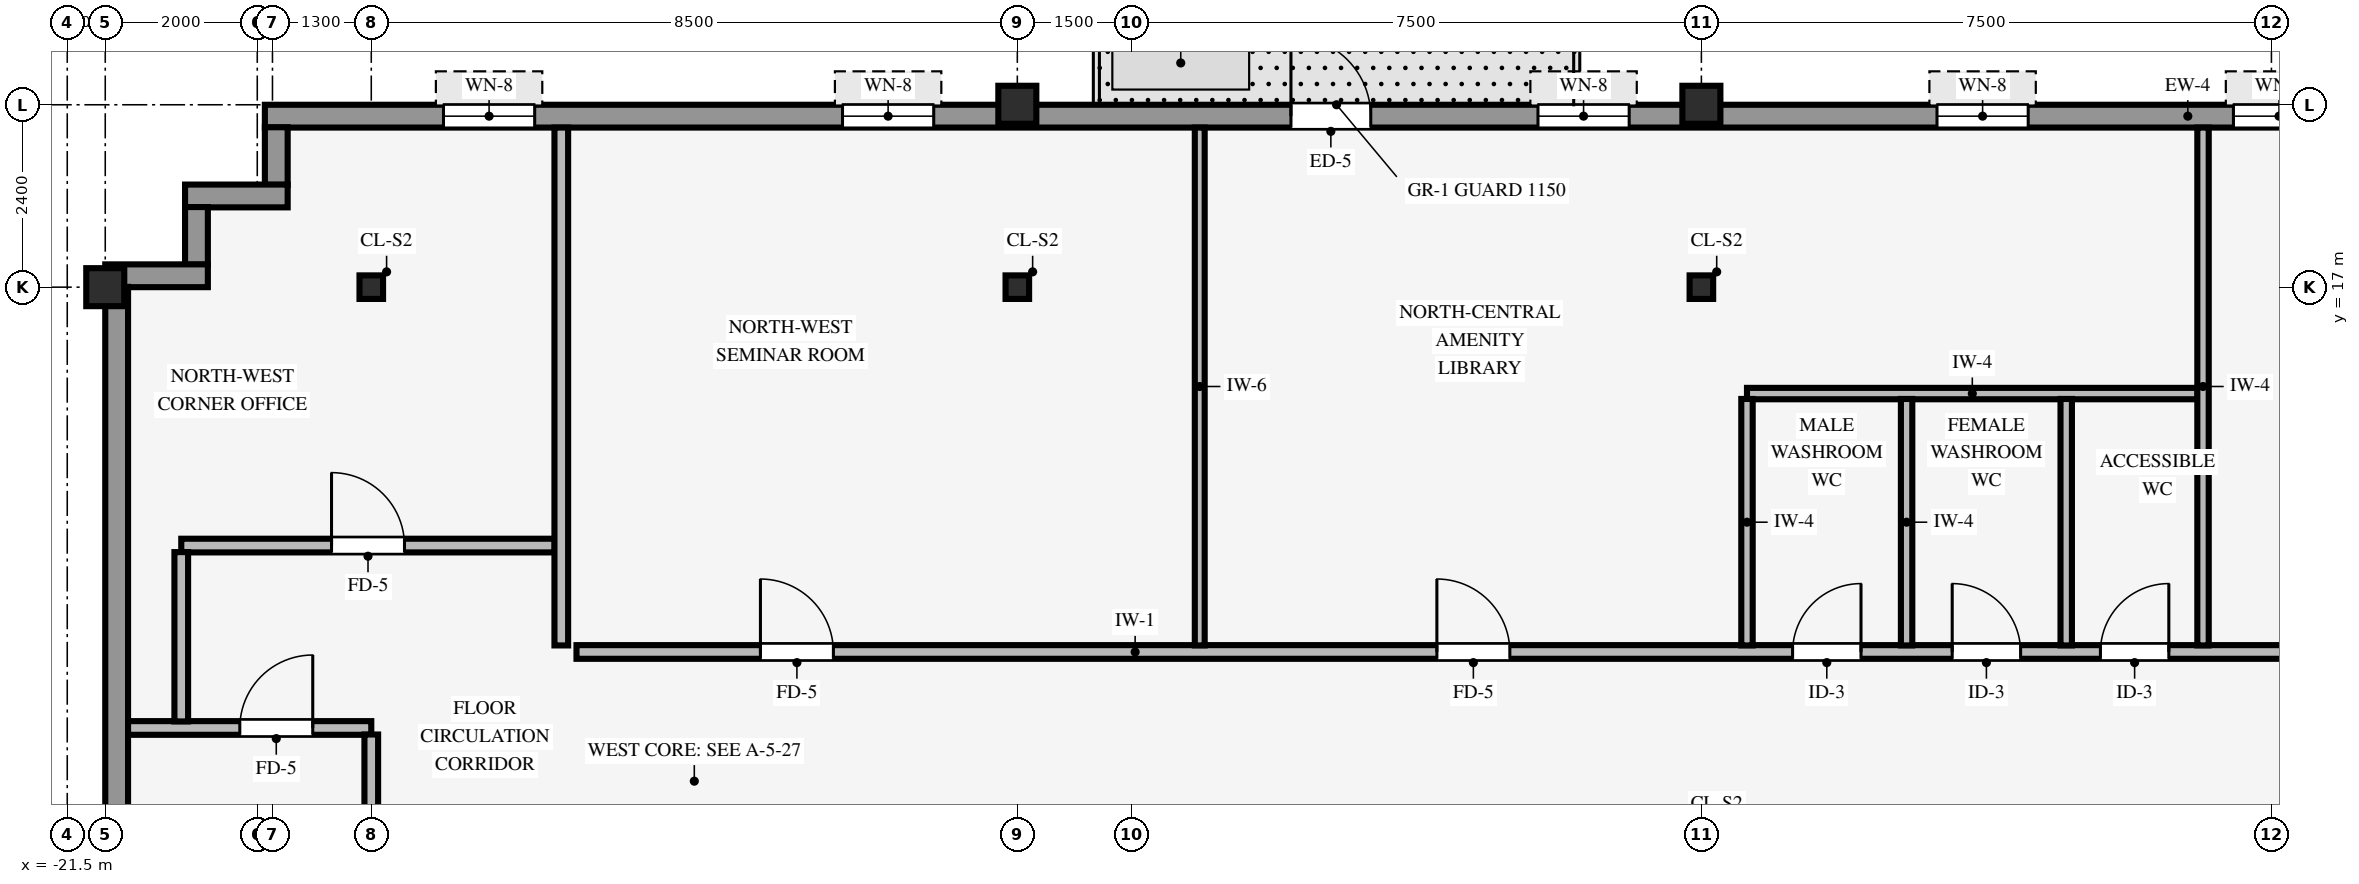
"""IFC4 building model, lengths in metres.
Left out: names, types, materials, properties, quantities, classifications, styles, units other than length and angle.
Written with IfcOpenShell. Run it as: python <this file> out.ifc"""

import sys

from ifc_helpers import new_model, si_unit, direction, frame, frame_2d, origin, origin_2d, place, context, subcontext, project, spatial, rectangle, hollow_rectangle, i_section, extrude, source, transform, mapped, element, fill, save


model = new_model("IFC4")
c1 = context("Model", 3, precision=1e-05, world=origin(), true_north=direction((0.0, 1.0)))
c2 = subcontext(c1, "Body", "Model", "MODEL_VIEW")
j1 = project(units=[si_unit("LENGTHUNIT", "METRE"), si_unit("PLANEANGLEUNIT", "RADIAN")], contexts=[c1])
p1 = place(None, origin())
s1 = spatial("IfcSite", under=j1, at=p1, CompositionType="ELEMENT")
p2 = place(p1, origin())
s2 = spatial("IfcBuilding", under=s1, at=p2, CompositionType="ELEMENT")
p3 = place(p2, frame((0.0, 0.0, 249.3)))
s3 = spatial("IfcBuildingStorey", under=s2, at=p3, CompositionType="ELEMENT", Elevation=249.3)
for number, where, z_axis, x_axis in (
    (1, (-21.0, 17.0, 0.0), (0.0, 0.0, 1.0), (1.0, 0.0, 0.0)),
    (2, (-9.0, 19.4, 0.0), (0.0, 0.0, 1.0), (1.0, 0.0, 0.0)),
    (3, (0.0, 19.4, 0.0), (0.0, 0.0, 1.0), (1.0, 0.0, 0.0)),
):
    element("IfcColumn", number, at=place(p3, frame(where, z_axis=z_axis, x_axis=x_axis)), inside=s3, PredefinedType="COLUMN", context=c2, shape_type="SweptSolid", body=[
        extrude(hollow_rectangle(XDim=0.5, YDim=0.5, WallThickness=0.032, InnerFilletRadius=0.032, OuterFilletRadius=0.064, at=origin_2d()), origin(), (0.0, 0.0, 1.0), 3.25),
    ])
for number, where, z_axis, x_axis in (
    (4, (0.0, 17.0, 0.0), (0.0, 0.0, 1.0), (1.0, 0.0, 0.0)),
    (5, (-17.5, 17.0, 0.0), (0.0, 0.0, 1.0), (1.0, 0.0, 0.0)),
    (6, (-9.0, 17.0, 0.0), (0.0, 0.0, 1.0), (1.0, 0.0, 0.0)),
):
    element("IfcColumn", number, at=place(p3, frame(where, z_axis=z_axis, x_axis=x_axis)), inside=s3, PredefinedType="COLUMN", context=c2, shape_type="SweptSolid", body=[
        extrude(i_section(OverallWidth=0.31, OverallDepth=0.31, WebThickness=0.015, FlangeThickness=0.015, FilletRadius=0.015, at=origin_2d()), origin(), (0.0, 0.0, 1.0), 3.25),
    ])
p4 = place(p3, frame((-18.9, 19.25, 0.0), z_axis=(0.0, 0.0, 1.0), x_axis=(1.0, 0.0, 0.0)))
e7 = element("IfcWall", 7, at=p4, inside=s3, PredefinedType="STANDARD", context=c2, shape_type="SweptSolid", body=[
    extrude(rectangle(XDim=35.6, YDim=0.3, at=frame_2d((17.8, 0.0))), origin(), (0.0, 0.0, 1.0), 2.585),
])
p5 = place(p4, frame((13.5, 0.0, 0.0)))
e8 = element("IfcOpeningElement", 8, at=p5, cuts=e7, PredefinedType="OPENING", context=c2, shape_type="SweptSolid", body=[
    extrude(rectangle(XDim=1.05, YDim=2.1, at=frame_2d((0.525, 1.05))), frame((0.0, 0.16, 0.0), z_axis=(0.0, -1.0, 0.0), x_axis=(1.0, 0.0, 0.0)), (0.0, 0.0, 1.0), 0.32),
])
p6 = place(p4, frame((2.35, 0.0, 0.8)))
e9 = element("IfcOpeningElement", 9, at=p6, cuts=e7, PredefinedType="OPENING", context=c2, shape_type="SweptSolid", body=[
    extrude(rectangle(XDim=1.2, YDim=1.48, at=frame_2d((0.6, 0.74))), frame((0.0, 0.16, 0.0), z_axis=(0.0, -1.0, 0.0), x_axis=(1.0, 0.0, 0.0)), (0.0, 0.0, 1.0), 0.32),
])
p7 = place(p4, frame((7.6, 0.0, 0.8)))
e10 = element("IfcOpeningElement", 10, at=p7, cuts=e7, PredefinedType="OPENING", context=c2, shape_type="SweptSolid", body=[
    extrude(rectangle(XDim=1.2, YDim=1.48, at=frame_2d((0.6, 0.74))), frame((0.0, 0.16, 0.0), z_axis=(0.0, -1.0, 0.0), x_axis=(1.0, 0.0, 0.0)), (0.0, 0.0, 1.0), 0.32),
])
p8 = place(p4, frame((16.75, 0.0, 0.8)))
e11 = element("IfcOpeningElement", 11, at=p8, cuts=e7, PredefinedType="OPENING", context=c2, shape_type="SweptSolid", body=[
    extrude(rectangle(XDim=1.2, YDim=1.48, at=frame_2d((0.6, 0.74))), frame((0.0, 0.16, 0.0), z_axis=(0.0, -1.0, 0.0), x_axis=(1.0, 0.0, 0.0)), (0.0, 0.0, 1.0), 0.32),
])
p9 = place(p4, frame((22.0, 0.0, 0.8)))
e12 = element("IfcOpeningElement", 12, at=p9, cuts=e7, PredefinedType="OPENING", context=c2, shape_type="SweptSolid", body=[
    extrude(rectangle(XDim=1.2, YDim=1.48, at=frame_2d((0.6, 0.74))), frame((0.0, 0.16, 0.0), z_axis=(0.0, -1.0, 0.0), x_axis=(1.0, 0.0, 0.0)), (0.0, 0.0, 1.0), 0.32),
])
p10 = place(p4, frame((25.9, 0.0, 0.8)))
e13 = element("IfcOpeningElement", 13, at=p10, cuts=e7, PredefinedType="OPENING", context=c2, shape_type="SweptSolid", body=[
    extrude(rectangle(XDim=1.2, YDim=1.48, at=frame_2d((0.6, 0.74))), frame((0.0, 0.16, 0.0), z_axis=(0.0, -1.0, 0.0), x_axis=(1.0, 0.0, 0.0)), (0.0, 0.0, 1.0), 0.32),
])
p11 = place(p4, frame((31.6, 0.0, 0.8)))
e14 = element("IfcOpeningElement", 14, at=p11, cuts=e7, PredefinedType="OPENING", context=c2, shape_type="SweptSolid", body=[
    extrude(rectangle(XDim=1.2, YDim=1.48, at=frame_2d((0.6, 0.74))), frame((0.0, 0.16, 0.0), z_axis=(0.0, -1.0, 0.0), x_axis=(1.0, 0.0, 0.0)), (0.0, 0.0, 1.0), 0.32),
])
p12 = place(p3, frame((-18.75, 18.346, 0.0), z_axis=(0.0, 0.0, 1.0), x_axis=(0.0, 1.0, 0.0)))
e15 = element("IfcWall", 15, at=p12, inside=s3, PredefinedType="STANDARD", context=c2, shape_type="SweptSolid", body=[
    extrude(rectangle(XDim=0.758, YDim=0.3, at=frame_2d((0.379, 0.0))), origin(), (0.0, 0.0, 1.0), 2.335),
])
p13 = place(p3, frame((-19.95, 18.2, 0.0), z_axis=(0.0, 0.0, 1.0), x_axis=(1.0, 0.0, 0.0)))
e16 = element("IfcWall", 16, at=p13, inside=s3, PredefinedType="STANDARD", context=c2, shape_type="SweptSolid", body=[
    extrude(rectangle(XDim=1.35, YDim=0.3, at=frame_2d((0.675, 0.0))), origin(), (0.0, 0.0, 1.0), 2.335),
])
p14 = place(p3, frame((-19.8, 17.296, 0.0), z_axis=(0.0, 0.0, 1.0), x_axis=(0.0, 1.0, 0.0)))
e17 = element("IfcWall", 17, at=p14, inside=s3, PredefinedType="STANDARD", context=c2, shape_type="SweptSolid", body=[
    extrude(rectangle(XDim=0.758, YDim=0.3, at=frame_2d((0.379, 0.0))), origin(), (0.0, 0.0, 1.0), 2.335),
])
p15 = place(p3, frame((-21.0, 17.15, 0.0), z_axis=(0.0, 0.0, 1.0), x_axis=(1.0, 0.0, 0.0)))
e18 = element("IfcWall", 18, at=p15, inside=s3, PredefinedType="STANDARD", context=c2, shape_type="SweptSolid", body=[
    extrude(rectangle(XDim=1.35, YDim=0.3, at=frame_2d((0.675, 0.0))), origin(), (0.0, 0.0, 1.0), 2.335),
])
p16 = place(p3, frame((-20.85, 3.6, 0.0), z_axis=(0.0, 0.0, 1.0), x_axis=(0.0, 1.0, 0.0)))
e19 = element("IfcWall", 19, at=p16, inside=s3, PredefinedType="STANDARD", context=c2, shape_type="SweptSolid", body=[
    extrude(rectangle(XDim=13.404, YDim=0.3, at=frame_2d((6.702, 0.0))), origin(), (0.0, 0.0, 1.0), 2.585),
])
p17 = place(p16, frame((2.876, 0.0, 0.8)))
e20 = element("IfcOpeningElement", 20, at=p17, cuts=e19, PredefinedType="OPENING", context=c2, shape_type="SweptSolid", body=[
    extrude(rectangle(XDim=1.95, YDim=1.48, at=frame_2d((0.975, 0.74))), frame((0.0, 0.16, 0.0), z_axis=(0.0, -1.0, 0.0), x_axis=(1.0, 0.0, 0.0)), (0.0, 0.0, 1.0), 0.32),
])
p18 = place(p3, frame((-20.7, 11.2, 0.0), z_axis=(0.0, 0.0, 1.0), x_axis=(1.0, 0.0, 0.0)))
e21 = element("IfcWall", 21, at=p18, inside=s3, PredefinedType="PARTITIONING", context=c2, shape_type="SweptSolid", body=[
    extrude(rectangle(XDim=3.2, YDim=0.18, at=frame_2d((1.6, 0.0))), origin(), (0.0, 0.0, 1.0), 3.24),
])
p19 = place(p18, frame((1.47, 0.0, 0.0)))
e22 = element("IfcOpeningElement", 22, at=p19, cuts=e21, PredefinedType="OPENING", context=c2, shape_type="SweptSolid", body=[
    extrude(rectangle(XDim=0.96, YDim=2.1, at=frame_2d((0.48, 1.05))), frame((0.0, 0.1, 0.0), z_axis=(0.0, -1.0, 0.0), x_axis=(1.0, 0.0, 0.0)), (0.0, 0.0, 1.0), 0.2),
])
p20 = place(p3, frame((-14.8, 12.2, 0.0), z_axis=(0.0, 0.0, 1.0), x_axis=(1.0, 0.0, 0.0)))
e23 = element("IfcWall", 23, at=p20, inside=s3, PredefinedType="PARTITIONING", context=c2, shape_type="SweptSolid", body=[
    extrude(rectangle(XDim=30.6, YDim=0.18, at=frame_2d((15.3, 0.0))), origin(), (0.0, 0.0, 1.0), 3.24),
])
p21 = place(p20, frame((11.32, 0.0, 0.0)))
e24 = element("IfcOpeningElement", 24, at=p21, cuts=e23, PredefinedType="OPENING", context=c2, shape_type="SweptSolid", body=[
    extrude(rectangle(XDim=0.96, YDim=2.1, at=frame_2d((0.48, 1.05))), frame((0.0, 0.1, 0.0), z_axis=(0.0, -1.0, 0.0), x_axis=(1.0, 0.0, 0.0)), (0.0, 0.0, 1.0), 0.2),
])
p22 = place(p20, frame((26.72, 0.0, 0.0)))
e25 = element("IfcOpeningElement", 25, at=p22, cuts=e23, PredefinedType="OPENING", context=c2, shape_type="SweptSolid", body=[
    extrude(rectangle(XDim=0.96, YDim=2.1, at=frame_2d((0.48, 1.05))), frame((0.0, 0.1, 0.0), z_axis=(0.0, -1.0, 0.0), x_axis=(1.0, 0.0, 0.0)), (0.0, 0.0, 1.0), 0.2),
])
p23 = place(p20, frame((2.42, 0.0, 0.0)))
e26 = element("IfcOpeningElement", 26, at=p23, cuts=e23, PredefinedType="OPENING", context=c2, shape_type="SweptSolid", body=[
    extrude(rectangle(XDim=0.96, YDim=2.1, at=frame_2d((0.48, 1.05))), frame((0.0, 0.1, 0.0), z_axis=(0.0, -1.0, 0.0), x_axis=(1.0, 0.0, 0.0)), (0.0, 0.0, 1.0), 0.2),
])
p24 = place(p20, frame((16.0, 0.0, 0.0)))
e27 = element("IfcOpeningElement", 27, at=p24, cuts=e23, PredefinedType="OPENING", context=c2, shape_type="SweptSolid", body=[
    extrude(rectangle(XDim=0.9, YDim=2.1, at=frame_2d((0.45, 1.05))), frame((0.0, 0.1, 0.0), z_axis=(0.0, -1.0, 0.0), x_axis=(1.0, 0.0, 0.0)), (0.0, 0.0, 1.0), 0.2),
])
p25 = place(p20, frame((18.1, 0.0, 0.0)))
e28 = element("IfcOpeningElement", 28, at=p25, cuts=e23, PredefinedType="OPENING", context=c2, shape_type="SweptSolid", body=[
    extrude(rectangle(XDim=0.9, YDim=2.1, at=frame_2d((0.45, 1.05))), frame((0.0, 0.1, 0.0), z_axis=(0.0, -1.0, 0.0), x_axis=(1.0, 0.0, 0.0)), (0.0, 0.0, 1.0), 0.2),
])
p26 = place(p20, frame((20.05, 0.0, 0.0)))
e29 = element("IfcOpeningElement", 29, at=p26, cuts=e23, PredefinedType="OPENING", context=c2, shape_type="SweptSolid", body=[
    extrude(rectangle(XDim=0.9, YDim=2.1, at=frame_2d((0.45, 1.05))), frame((0.0, 0.1, 0.0), z_axis=(0.0, -1.0, 0.0), x_axis=(1.0, 0.0, 0.0)), (0.0, 0.0, 1.0), 0.2),
])
p27 = place(p3, frame((-20.0, 13.6, 0.0), z_axis=(0.0, 0.0, 1.0), x_axis=(1.0, 0.0, 0.0)))
e30 = element("IfcWall", 30, at=p27, inside=s3, PredefinedType="PARTITIONING", context=c2, shape_type="SweptSolid", body=[
    extrude(rectangle(XDim=4.914, YDim=0.18, at=frame_2d((2.457, 0.0))), origin(), (0.0, 0.0, 1.0), 2.929),
])
p28 = place(p27, frame((1.977, 0.0, 0.0)))
e31 = element("IfcOpeningElement", 31, at=p28, cuts=e30, PredefinedType="OPENING", context=c2, shape_type="SweptSolid", body=[
    extrude(rectangle(XDim=0.96, YDim=2.1, at=frame_2d((0.48, 1.05))), frame((0.0, 0.1, 0.0), z_axis=(0.0, -1.0, 0.0), x_axis=(1.0, 0.0, 0.0)), (0.0, 0.0, 1.0), 0.2),
])
p29 = place(p3, frame((0.6, 15.6, 0.0), z_axis=(0.0, 0.0, 1.0), x_axis=(1.0, 0.0, 0.0)))
e32 = element("IfcWall", 32, at=p29, inside=s3, PredefinedType="PARTITIONING", context=c2, shape_type="SweptSolid", body=[
    extrude(rectangle(XDim=5.929, YDim=0.15, at=frame_2d((2.964, 0.0))), origin(), (0.0, 0.0, 1.0), 3.24),
])
p30 = place(p3, frame((-20.0, 11.286, 0.0), z_axis=(0.0, 0.0, 1.0), x_axis=(0.0, 1.0, 0.0)))
e33 = element("IfcWall", 33, at=p30, inside=s3, PredefinedType="PARTITIONING", context=c2, shape_type="SweptSolid", body=[
    extrude(rectangle(XDim=2.228, YDim=0.18, at=frame_2d((1.114, 0.0))), origin(), (0.0, 0.0, 1.0), 3.24),
])
p31 = place(p3, frame((-17.5, 9.996, 0.0), z_axis=(0.0, 0.0, 1.0), x_axis=(0.0, 1.0, 0.0)))
e34 = element("IfcWall", 34, at=p31, inside=s3, PredefinedType="PARTITIONING", context=c2, shape_type="SweptSolid", body=[
    extrude(rectangle(XDim=1.118, YDim=0.18, at=frame_2d((0.559, 0.0))), origin(), (0.0, 0.0, 1.0), 2.335),
])
p32 = place(p3, frame((-15.0, 12.286, 0.0), z_axis=(0.0, 0.0, 1.0), x_axis=(0.0, 1.0, 0.0)))
e35 = element("IfcWall", 35, at=p32, inside=s3, PredefinedType="PARTITIONING", context=c2, shape_type="SweptSolid", body=[
    extrude(rectangle(XDim=6.814, YDim=0.18, at=frame_2d((3.407, 0.0))), origin(), (0.0, 0.0, 1.0), 3.24),
])
p33 = place(p3, frame((-6.6, 12.286, 0.0), z_axis=(0.0, 0.0, 1.0), x_axis=(0.0, 1.0, 0.0)))
e36 = element("IfcWall", 36, at=p33, inside=s3, PredefinedType="PARTITIONING", context=c2, shape_type="SweptSolid", body=[
    extrude(rectangle(XDim=6.814, YDim=0.13, at=frame_2d((3.407, 0.0))), origin(), (0.0, 0.0, 1.0), 3.24),
])
for number, where, z_axis, x_axis in (
    (37, (0.6, 12.286, 0.0), (0.0, 0.0, 1.0), (0.0, 1.0, 0.0)),
    (38, (2.7, 12.286, 0.0), (0.0, 0.0, 1.0), (0.0, 1.0, 0.0)),
    (39, (4.8, 12.286, 0.0), (0.0, 0.0, 1.0), (0.0, 1.0, 0.0)),
):
    element("IfcWall", number, at=place(p3, frame(where, z_axis=z_axis, x_axis=x_axis)), inside=s3, PredefinedType="PARTITIONING", context=c2, shape_type="SweptSolid", body=[
        extrude(rectangle(XDim=3.243, YDim=0.15, at=frame_2d((1.622, 0.0))), origin(), (0.0, 0.0, 1.0), 3.24),
    ])
p34 = place(p3, frame((6.6, 12.286, 0.0), z_axis=(0.0, 0.0, 1.0), x_axis=(0.0, 1.0, 0.0)))
e40 = element("IfcWall", 40, at=p34, inside=s3, PredefinedType="PARTITIONING", context=c2, shape_type="SweptSolid", body=[
    extrude(rectangle(XDim=6.814, YDim=0.15, at=frame_2d((3.407, 0.0))), origin(), (0.0, 0.0, 1.0), 3.24),
])
m1 = source(origin(), c2, "Body", "SweptSolid", [
    extrude(rectangle(XDim=1.05, YDim=2.1, at=frame_2d((0.525, 1.05))), frame((0.0, 0.025, 0.0), z_axis=(0.0, -1.0, 0.0), x_axis=(1.0, 0.0, 0.0)), (0.0, 0.0, 1.0), 0.05),
])
p35 = place(p5, origin())
e41 = element("IfcDoor", 41, at=p35, inside=s3, OperationType="SINGLE_SWING_LEFT", PredefinedType="DOOR", context=c2, shape_type="MappedRepresentation", body=[
    mapped(m1, transform((0.0, 0.0, 0.0), scale=1.0)),
])
fill(e8, e41)
m2 = source(origin(), c2, "Body", "SweptSolid", [
    extrude(rectangle(XDim=1.2, YDim=1.48, at=frame_2d((0.6, 0.74))), frame((0.0, 0.03, 0.0), z_axis=(0.0, -1.0, 0.0), x_axis=(1.0, 0.0, 0.0)), (0.0, 0.0, 1.0), 0.06),
])
p36 = place(p6, origin())
e42 = element("IfcWindow", 42, at=p36, inside=s3, PartitioningType="SINGLE_PANEL", PredefinedType="WINDOW", context=c2, shape_type="MappedRepresentation", body=[
    mapped(m2, transform((0.0, 0.0, 0.0), scale=1.0)),
])
fill(e9, e42)
p37 = place(p7, origin())
e43 = element("IfcWindow", 43, at=p37, inside=s3, PartitioningType="SINGLE_PANEL", PredefinedType="WINDOW", context=c2, shape_type="MappedRepresentation", body=[
    mapped(m2, transform((0.0, 0.0, 0.0), scale=1.0)),
])
fill(e10, e43)
p38 = place(p8, origin())
e44 = element("IfcWindow", 44, at=p38, inside=s3, PartitioningType="SINGLE_PANEL", PredefinedType="WINDOW", context=c2, shape_type="MappedRepresentation", body=[
    mapped(m2, transform((0.0, 0.0, 0.0), scale=1.0)),
])
fill(e11, e44)
p39 = place(p9, origin())
e45 = element("IfcWindow", 45, at=p39, inside=s3, PartitioningType="SINGLE_PANEL", PredefinedType="WINDOW", context=c2, shape_type="MappedRepresentation", body=[
    mapped(m2, transform((0.0, 0.0, 0.0), scale=1.0)),
])
fill(e12, e45)
p40 = place(p10, origin())
e46 = element("IfcWindow", 46, at=p40, inside=s3, PartitioningType="SINGLE_PANEL", PredefinedType="WINDOW", context=c2, shape_type="MappedRepresentation", body=[
    mapped(m2, transform((0.0, 0.0, 0.0), scale=1.0)),
])
fill(e13, e46)
m3 = source(origin(), c2, "Body", "SweptSolid", [
    extrude(rectangle(XDim=0.96, YDim=2.1, at=frame_2d((0.48, 1.05))), frame((0.0, 0.025, 0.0), z_axis=(0.0, -1.0, 0.0), x_axis=(1.0, 0.0, 0.0)), (0.0, 0.0, 1.0), 0.05),
])
p41 = place(p21, origin())
e47 = element("IfcDoor", 47, at=p41, inside=s3, OperationType="SINGLE_SWING_LEFT", PredefinedType="DOOR", context=c2, shape_type="MappedRepresentation", body=[
    mapped(m3, transform((0.0, 0.0, 0.0), scale=1.0)),
])
fill(e24, e47)
p42 = place(p23, origin())
e48 = element("IfcDoor", 48, at=p42, inside=s3, OperationType="SINGLE_SWING_LEFT", PredefinedType="DOOR", context=c2, shape_type="MappedRepresentation", body=[
    mapped(m3, transform((0.0, 0.0, 0.0), scale=1.0)),
])
fill(e26, e48)
p43 = place(p28, origin())
e49 = element("IfcDoor", 49, at=p43, inside=s3, OperationType="SINGLE_SWING_LEFT", PredefinedType="DOOR", context=c2, shape_type="MappedRepresentation", body=[
    mapped(m3, transform((0.0, 0.0, 0.0), scale=1.0)),
])
fill(e31, e49)
p44 = place(p19, origin())
e50 = element("IfcDoor", 50, at=p44, inside=s3, OperationType="SINGLE_SWING_RIGHT", PredefinedType="DOOR", context=c2, shape_type="MappedRepresentation", body=[
    mapped(m3, transform((0.0, 0.0, 0.0), scale=1.0)),
])
fill(e22, e50)
m4 = source(origin(), c2, "Body", "SweptSolid", [
    extrude(rectangle(XDim=0.9, YDim=2.1, at=frame_2d((0.45, 1.05))), frame((0.0, 0.025, 0.0), z_axis=(0.0, -1.0, 0.0), x_axis=(1.0, 0.0, 0.0)), (0.0, 0.0, 1.0), 0.05),
])
p45 = place(p24, origin())
e51 = element("IfcDoor", 51, at=p45, inside=s3, OperationType="SINGLE_SWING_RIGHT", PredefinedType="DOOR", context=c2, shape_type="MappedRepresentation", body=[
    mapped(m4, transform((0.0, 0.0, 0.0), scale=1.0)),
])
fill(e27, e51)
p46 = place(p25, origin())
e52 = element("IfcDoor", 52, at=p46, inside=s3, OperationType="SINGLE_SWING_LEFT", PredefinedType="DOOR", context=c2, shape_type="MappedRepresentation", body=[
    mapped(m4, transform((0.0, 0.0, 0.0), scale=1.0)),
])
fill(e28, e52)
p47 = place(p26, origin())
e53 = element("IfcDoor", 53, at=p47, inside=s3, OperationType="SINGLE_SWING_RIGHT", PredefinedType="DOOR", context=c2, shape_type="MappedRepresentation", body=[
    mapped(m4, transform((0.0, 0.0, 0.0), scale=1.0)),
])
fill(e29, e53)
save(model, sys.argv[1])
